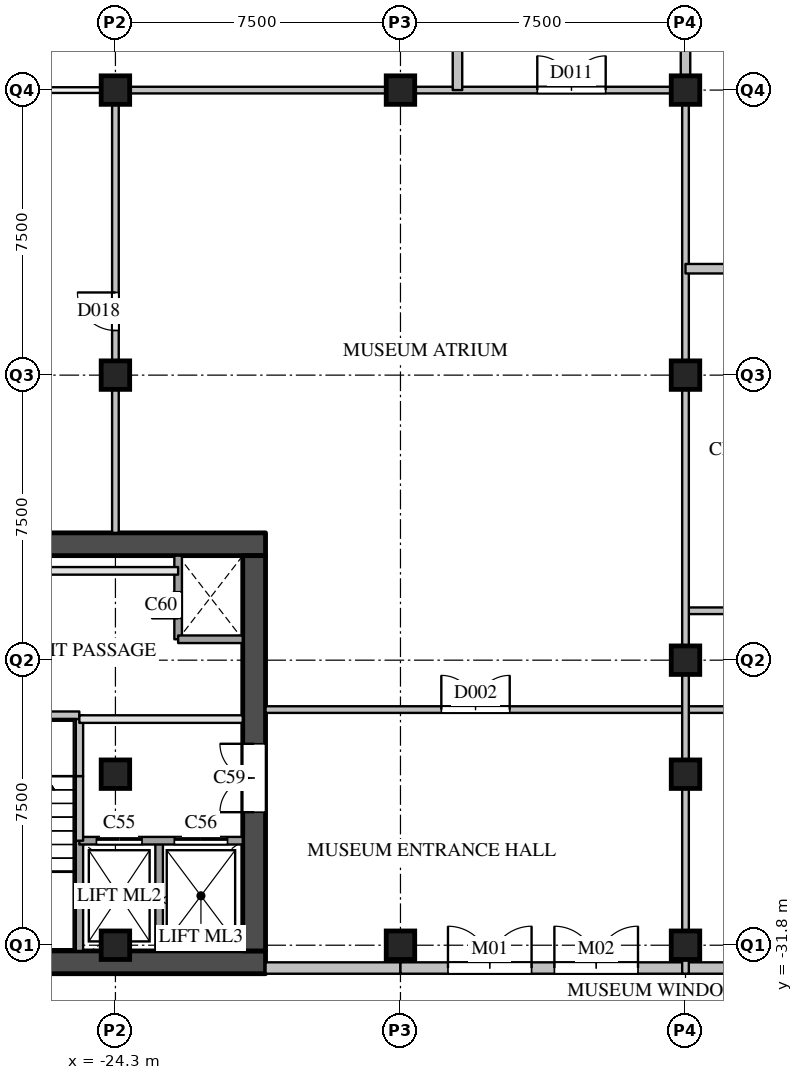
"""IFC4 building model, lengths in metres.
Left out: names, types, materials, properties, quantities, classifications, styles, units other than length and angle.
Written with IfcOpenShell. Run it as: python <this file> out.ifc"""

import sys

from ifc_helpers import new_model, si_unit, direction, frame, frame_2d, origin, origin_2d, place, context, subcontext, project, spatial, rectangle, extrude, element, fill, save


model = new_model("IFC4")
c1 = context("Model", 3, precision=1e-05, world=origin(), true_north=direction((0.0, 1.0)))
c2 = subcontext(c1, "Body", "Model", "MODEL_VIEW")
j1 = project(units=[si_unit("LENGTHUNIT", "METRE"), si_unit("PLANEANGLEUNIT", "RADIAN")], contexts=[c1])
p1 = place(None, origin())
s1 = spatial("IfcSite", under=j1, at=p1, CompositionType="ELEMENT")
p2 = place(p1, origin())
s2 = spatial("IfcBuilding", under=s1, at=p2, CompositionType="ELEMENT")
p3 = place(p2, origin())
s3 = spatial("IfcBuildingStorey", under=s2, at=p3, CompositionType="ELEMENT", Elevation=0.0)
for number, where, z_axis, x_axis in (
    (1, (-24.3, -31.8, 0.0), (0.0, 0.0, 1.0), (1.0, 0.0, 0.0)),
    (2, (-24.3, -16.8, 0.0), (0.0, 0.0, 1.0), (1.0, 0.0, 0.0)),
    (3, (-24.3, -9.3, 0.0), (0.0, 0.0, 1.0), (1.0, 0.0, 0.0)),
    (4, (-16.8, -31.8, 0.0), (0.0, 0.0, 1.0), (1.0, 0.0, 0.0)),
    (5, (-16.8, -9.3, 0.0), (0.0, 0.0, 1.0), (1.0, 0.0, 0.0)),
    (6, (-9.3, -31.8, 0.0), (0.0, 0.0, 1.0), (1.0, 0.0, 0.0)),
    (7, (-9.3, -24.3, 0.0), (0.0, 0.0, 1.0), (1.0, 0.0, 0.0)),
    (8, (-9.3, -16.8, 0.0), (0.0, 0.0, 1.0), (1.0, 0.0, 0.0)),
    (9, (-9.3, -9.3, 0.0), (0.0, 0.0, 1.0), (1.0, 0.0, 0.0)),
    (10, (-24.3, -27.3, 0.0), (0.0, 0.0, 1.0), (1.0, 0.0, 0.0)),
    (11, (-9.3, -27.3, 0.0), (0.0, 0.0, 1.0), (1.0, 0.0, 0.0)),
):
    element("IfcColumn", number, at=place(p3, frame(where, z_axis=z_axis, x_axis=x_axis)), inside=s3, PredefinedType="COLUMN", context=c2, shape_type="SweptSolid", body=[
        extrude(rectangle(XDim=0.75, YDim=0.75, at=origin_2d()), origin(), (0.0, 0.0, 1.0), 8.0),
    ])
p4 = place(p3, frame((-20.35, -32.4, 0.0), z_axis=(0.0, 0.0, 1.0), x_axis=(1.0, 0.0, 0.0)))
e12 = element("IfcWall", 12, at=p4, inside=s3, PredefinedType="SOLIDWALL", context=c2, shape_type="SweptSolid", body=[
    extrude(rectangle(XDim=3.55, YDim=0.3, at=frame_2d((1.775, 0.0))), origin(), (0.0, 0.0, 1.0), 7.59),
])
p5 = place(p3, frame((-16.8, -32.4, 0.0), z_axis=(0.0, 0.0, 1.0), x_axis=(1.0, 0.0, 0.0)))
e13 = element("IfcWall", 13, at=p5, inside=s3, PredefinedType="SOLIDWALL", context=c2, shape_type="SweptSolid", body=[
    extrude(rectangle(XDim=7.5, YDim=0.3, at=frame_2d((3.75, 0.0))), origin(), (0.0, 0.0, 1.0), 7.59),
])
p6 = place(p5, frame((1.25, 0.0, 0.0)))
e14 = element("IfcOpeningElement", 14, at=p6, cuts=e13, PredefinedType="OPENING", context=c2, shape_type="SweptSolid", body=[
    extrude(rectangle(XDim=2.2, YDim=2.4, at=frame_2d((1.1, 1.2))), frame((0.0, 0.16, 0.0), z_axis=(0.0, -1.0, 0.0), x_axis=(1.0, 0.0, 0.0)), (0.0, 0.0, 1.0), 0.32),
])
p7 = place(p5, frame((4.05, 0.0, 0.0)))
e15 = element("IfcOpeningElement", 15, at=p7, cuts=e13, PredefinedType="OPENING", context=c2, shape_type="SweptSolid", body=[
    extrude(rectangle(XDim=2.2, YDim=2.4, at=frame_2d((1.1, 1.2))), frame((0.0, 0.16, 0.0), z_axis=(0.0, -1.0, 0.0), x_axis=(1.0, 0.0, 0.0)), (0.0, 0.0, 1.0), 0.32),
])
p8 = place(p3, frame((-9.3, -32.4, 0.0), z_axis=(0.0, 0.0, 1.0), x_axis=(1.0, 0.0, 0.0)))
e16 = element("IfcWall", 16, at=p8, inside=s3, PredefinedType="SOLIDWALL", context=c2, shape_type="SweptSolid", body=[
    extrude(rectangle(XDim=7.5, YDim=0.3, at=frame_2d((3.75, 0.0))), origin(), (0.0, 0.0, 1.0), 7.59),
])
p9 = place(p8, frame((1.95, 0.0, 0.9)))
e17 = element("IfcOpeningElement", 17, at=p9, cuts=e16, PredefinedType="OPENING", context=c2, shape_type="SweptSolid", body=[
    extrude(rectangle(XDim=3.6, YDim=3.0, at=frame_2d((1.8, 1.5))), frame((0.0, 0.16, 0.0), z_axis=(0.0, -1.0, 0.0), x_axis=(1.0, 0.0, 0.0)), (0.0, 0.0, 1.0), 0.32),
])
for number, where, z_axis, x_axis in (
    (18, (-32.55, -32.25, 0.0), (0.0, 0.0, 1.0), (1.0, 0.0, 0.0)),
    (19, (-32.55, -21.25, 0.0), (0.0, 0.0, 1.0), (1.0, 0.0, 0.0)),
):
    element("IfcWall", number, at=place(p3, frame(where, z_axis=z_axis, x_axis=x_axis)), inside=s3, PredefinedType="SHEAR", context=c2, shape_type="SweptSolid", body=[
        extrude(rectangle(XDim=12.2, YDim=0.6, at=frame_2d((6.1, 0.0))), origin(), (0.0, 0.0, 1.0), 7.59),
    ])
p10 = place(p3, frame((-20.65, -31.95, 0.0), z_axis=(0.0, 0.0, 1.0), x_axis=(0.0, 1.0, 0.0)))
e20 = element("IfcWall", 20, at=p10, inside=s3, PredefinedType="SHEAR", context=c2, shape_type="SweptSolid", body=[
    extrude(rectangle(XDim=10.4, YDim=0.6, at=frame_2d((5.2, 0.0))), origin(), (0.0, 0.0, 1.0), 7.59),
])
p11 = place(p10, frame((3.65, 0.0, 0.0)))
e21 = element("IfcOpeningElement", 21, at=p11, cuts=e20, PredefinedType="OPENING", context=c2, shape_type="SweptSolid", body=[
    extrude(rectangle(XDim=1.8, YDim=2.1, at=frame_2d((0.9, 1.05))), frame((0.0, 0.31, 0.0), z_axis=(0.0, -1.0, 0.0), x_axis=(1.0, 0.0, 0.0)), (0.0, 0.0, 1.0), 0.62),
])
p12 = place(p3, frame((-25.25, -31.95, 0.0), z_axis=(0.0, 0.0, 1.0), x_axis=(0.0, 1.0, 0.0)))
e22 = element("IfcWall", 22, at=p12, inside=s3, PredefinedType="SOLIDWALL", context=c2, shape_type="SweptSolid", body=[
    extrude(rectangle(XDim=2.9, YDim=0.2, at=frame_2d((1.45, 0.0))), origin(), (0.0, 0.0, 1.0), 7.59),
])
p13 = place(p3, frame((-25.25, -29.05, 0.0), z_axis=(0.0, 0.0, 1.0), x_axis=(0.0, 1.0, 0.0)))
e23 = element("IfcWall", 23, at=p13, inside=s3, PredefinedType="SOLIDWALL", context=c2, shape_type="SweptSolid", body=[
    extrude(rectangle(XDim=1.7, YDim=0.2, at=frame_2d((0.85, 0.0))), origin(), (0.0, 0.0, 1.0), 7.59),
])
p14 = place(p3, frame((-25.25, -27.35, 0.0), z_axis=(0.0, 0.0, 1.0), x_axis=(0.0, 1.0, 0.0)))
e24 = element("IfcWall", 24, at=p14, inside=s3, PredefinedType="SOLIDWALL", context=c2, shape_type="SweptSolid", body=[
    extrude(rectangle(XDim=1.6, YDim=0.2, at=frame_2d((0.8, 0.0))), origin(), (0.0, 0.0, 1.0), 7.59),
])
p15 = place(p3, frame((-23.15, -31.95, 0.0), z_axis=(0.0, 0.0, 1.0), x_axis=(0.0, 1.0, 0.0)))
e25 = element("IfcWall", 25, at=p15, inside=s3, PredefinedType="SOLIDWALL", context=c2, shape_type="SweptSolid", body=[
    extrude(rectangle(XDim=2.9, YDim=0.2, at=frame_2d((1.45, 0.0))), origin(), (0.0, 0.0, 1.0), 7.59),
])
p16 = place(p3, frame((-22.65, -23.75, 0.0), z_axis=(0.0, 0.0, 1.0), x_axis=(0.0, 1.0, 0.0)))
e26 = element("IfcWall", 26, at=p16, inside=s3, PredefinedType="SOLIDWALL", context=c2, shape_type="SweptSolid", body=[
    extrude(rectangle(XDim=2.2, YDim=0.2, at=frame_2d((1.1, 0.0))), origin(), (0.0, 0.0, 1.0), 7.59),
])
p17 = place(p16, frame((0.55, 0.0, 0.0)))
e27 = element("IfcOpeningElement", 27, at=p17, cuts=e26, PredefinedType="OPENING", context=c2, shape_type="SweptSolid", body=[
    extrude(rectangle(XDim=0.7, YDim=2.1, at=frame_2d((0.35, 1.05))), frame((0.0, 0.11, 0.0), z_axis=(0.0, -1.0, 0.0), x_axis=(1.0, 0.0, 0.0)), (0.0, 0.0, 1.0), 0.22),
])
p18 = place(p3, frame((-25.25, -29.05, 0.0), z_axis=(0.0, 0.0, 1.0), x_axis=(1.0, 0.0, 0.0)))
e28 = element("IfcWall", 28, at=p18, inside=s3, PredefinedType="SOLIDWALL", context=c2, shape_type="SweptSolid", body=[
    extrude(rectangle(XDim=4.3, YDim=0.2, at=frame_2d((2.15, 0.0))), origin(), (0.0, 0.0, 1.0), 7.59),
])
p19 = place(p18, frame((0.45, 0.0, 0.0)))
e29 = element("IfcOpeningElement", 29, at=p19, cuts=e28, PredefinedType="OPENING", context=c2, shape_type="SweptSolid", body=[
    extrude(rectangle(XDim=1.2, YDim=2.1, at=frame_2d((0.6, 1.05))), frame((0.0, 0.11, 0.0), z_axis=(0.0, -1.0, 0.0), x_axis=(1.0, 0.0, 0.0)), (0.0, 0.0, 1.0), 0.22),
])
p20 = place(p18, frame((2.5, 0.0, 0.0)))
e30 = element("IfcOpeningElement", 30, at=p20, cuts=e28, PredefinedType="OPENING", context=c2, shape_type="SweptSolid", body=[
    extrude(rectangle(XDim=1.4, YDim=2.1, at=frame_2d((0.7, 1.05))), frame((0.0, 0.11, 0.0), z_axis=(0.0, -1.0, 0.0), x_axis=(1.0, 0.0, 0.0)), (0.0, 0.0, 1.0), 0.22),
])
p21 = place(p3, frame((-25.25, -25.85, 0.0), z_axis=(0.0, 0.0, 1.0), x_axis=(1.0, 0.0, 0.0)))
e31 = element("IfcWall", 31, at=p21, inside=s3, PredefinedType="PARTITIONING", context=c2, shape_type="SweptSolid", body=[
    extrude(rectangle(XDim=4.3, YDim=0.2, at=frame_2d((2.15, 0.0))), origin(), (0.0, 0.0, 1.0), 7.59),
])
p22 = place(p3, frame((-28.5, -25.75, 0.0), z_axis=(0.0, 0.0, 1.0), x_axis=(1.0, 0.0, 0.0)))
e32 = element("IfcWall", 32, at=p22, inside=s3, PredefinedType="SOLIDWALL", context=c2, shape_type="SweptSolid", body=[
    extrude(rectangle(XDim=3.25, YDim=0.2, at=frame_2d((1.625, 0.0))), origin(), (0.0, 0.0, 1.0), 7.59),
])
p23 = place(p22, frame((1.025, 0.0, 0.0)))
e33 = element("IfcOpeningElement", 33, at=p23, cuts=e32, PredefinedType="OPENING", context=c2, shape_type="SweptSolid", body=[
    extrude(rectangle(XDim=1.1, YDim=2.1, at=frame_2d((0.55, 1.05))), frame((0.0, 0.11, 0.0), z_axis=(0.0, -1.0, 0.0), x_axis=(1.0, 0.0, 0.0)), (0.0, 0.0, 1.0), 0.22),
])
p24 = place(p3, frame((-22.65, -23.75, 0.0), z_axis=(0.0, 0.0, 1.0), x_axis=(1.0, 0.0, 0.0)))
e34 = element("IfcWall", 34, at=p24, inside=s3, PredefinedType="SOLIDWALL", context=c2, shape_type="SweptSolid", body=[
    extrude(rectangle(XDim=1.7, YDim=0.2, at=frame_2d((0.85, 0.0))), origin(), (0.0, 0.0, 1.0), 7.59),
])
p25 = place(p3, frame((-31.95, -21.95, 0.0), z_axis=(0.0, 0.0, 1.0), x_axis=(1.0, 0.0, 0.0)))
e35 = element("IfcWall", 35, at=p25, inside=s3, PredefinedType="PARTITIONING", context=c2, shape_type="SweptSolid", body=[
    extrude(rectangle(XDim=9.3, YDim=0.2, at=frame_2d((4.65, 0.0))), origin(), (0.0, 0.0, 1.0), 7.59),
])
p26 = place(p3, frame((-20.35, -25.6, 0.0), z_axis=(0.0, 0.0, 1.0), x_axis=(1.0, 0.0, 0.0)))
e36 = element("IfcWall", 36, at=p26, inside=s3, PredefinedType="PARTITIONING", context=c2, shape_type="SweptSolid", body=[
    extrude(rectangle(XDim=19.15, YDim=0.175, at=frame_2d((9.575, 0.0))), origin(), (0.0, 0.0, 1.0), 6.79),
])
p27 = place(p26, frame((4.625, 0.0, 0.0)))
e37 = element("IfcOpeningElement", 37, at=p27, cuts=e36, PredefinedType="OPENING", context=c2, shape_type="SweptSolid", body=[
    extrude(rectangle(XDim=1.8, YDim=2.1, at=frame_2d((0.9, 1.05))), frame((0.0, 0.097, 0.0), z_axis=(0.0, -1.0, 0.0), x_axis=(1.0, 0.0, 0.0)), (0.0, 0.0, 1.0), 0.195),
])
p28 = place(p26, frame((14.6, 0.0, 0.0)))
e38 = element("IfcOpeningElement", 38, at=p28, cuts=e36, PredefinedType="OPENING", context=c2, shape_type="SweptSolid", body=[
    extrude(rectangle(XDim=1.0, YDim=2.1, at=frame_2d((0.5, 1.05))), frame((0.0, 0.097, 0.0), z_axis=(0.0, -1.0, 0.0), x_axis=(1.0, 0.0, 0.0)), (0.0, 0.0, 1.0), 0.195),
])
p29 = place(p3, frame((-9.3, -23.0, 0.0), z_axis=(0.0, 0.0, 1.0), x_axis=(1.0, 0.0, 0.0)))
e39 = element("IfcWall", 39, at=p29, inside=s3, PredefinedType="PARTITIONING", context=c2, shape_type="SweptSolid", body=[
    extrude(rectangle(XDim=11.05, YDim=0.175, at=frame_2d((5.525, 0.0))), origin(), (0.0, 0.0, 1.0), 6.79),
])
p30 = place(p29, frame((5.025, 0.0, 0.0)))
e40 = element("IfcOpeningElement", 40, at=p30, cuts=e39, PredefinedType="OPENING", context=c2, shape_type="SweptSolid", body=[
    extrude(rectangle(XDim=1.0, YDim=2.1, at=frame_2d((0.5, 1.05))), frame((0.0, 0.097, 0.0), z_axis=(0.0, -1.0, 0.0), x_axis=(1.0, 0.0, 0.0)), (0.0, 0.0, 1.0), 0.195),
])
p31 = place(p3, frame((-24.3, -9.3, 0.0), z_axis=(0.0, 0.0, 1.0), x_axis=(1.0, 0.0, 0.0)))
e41 = element("IfcWall", 41, at=p31, inside=s3, PredefinedType="PARTITIONING", context=c2, shape_type="SweptSolid", body=[
    extrude(rectangle(XDim=15.0, YDim=0.175, at=frame_2d((7.5, 0.0))), origin(), (0.0, 0.0, 1.0), 6.79),
])
p32 = place(p31, frame((11.1, 0.0, 0.0)))
e42 = element("IfcOpeningElement", 42, at=p32, cuts=e41, PredefinedType="OPENING", context=c2, shape_type="SweptSolid", body=[
    extrude(rectangle(XDim=1.8, YDim=2.1, at=frame_2d((0.9, 1.05))), frame((0.0, 0.097, 0.0), z_axis=(0.0, -1.0, 0.0), x_axis=(1.0, 0.0, 0.0)), (0.0, 0.0, 1.0), 0.195),
])
p33 = place(p3, frame((-24.3, -20.95, 0.0), z_axis=(0.0, 0.0, 1.0), x_axis=(0.0, 1.0, 0.0)))
e43 = element("IfcWall", 43, at=p33, inside=s3, PredefinedType="PARTITIONING", context=c2, shape_type="SweptSolid", body=[
    extrude(rectangle(XDim=11.65, YDim=0.175, at=frame_2d((5.825, 0.0))), origin(), (0.0, 0.0, 1.0), 6.79),
])
p34 = place(p33, frame((5.325, 0.0, 0.0)))
e44 = element("IfcOpeningElement", 44, at=p34, cuts=e43, PredefinedType="OPENING", context=c2, shape_type="SweptSolid", body=[
    extrude(rectangle(XDim=1.0, YDim=2.1, at=frame_2d((0.5, 1.05))), frame((0.0, 0.097, 0.0), z_axis=(0.0, -1.0, 0.0), x_axis=(1.0, 0.0, 0.0)), (0.0, 0.0, 1.0), 0.195),
])
p35 = place(p3, frame((-9.3, -32.55, 0.0), z_axis=(0.0, 0.0, 1.0), x_axis=(0.0, 1.0, 0.0)))
e45 = element("IfcWall", 45, at=p35, inside=s3, PredefinedType="PARTITIONING", context=c2, shape_type="SweptSolid", body=[
    extrude(rectangle(XDim=23.25, YDim=0.175, at=frame_2d((11.625, 0.0))), origin(), (0.0, 0.0, 1.0), 6.79),
])
p36 = place(p3, frame((-27.3, -9.3, 0.0), z_axis=(0.0, 0.0, 1.0), x_axis=(1.0, 0.0, 0.0)))
e46 = element("IfcWall", 46, at=p36, inside=s3, PredefinedType="PARTITIONING", context=c2, shape_type="SweptSolid", body=[
    extrude(rectangle(XDim=3.0, YDim=0.15, at=frame_2d((1.5, 0.0))), origin(), (0.0, 0.0, 1.0), 6.79),
])
p37 = place(p3, frame((-9.3, -14.0, 0.0), z_axis=(0.0, 0.0, 1.0), x_axis=(1.0, 0.0, 0.0)))
e47 = element("IfcWall", 47, at=p37, inside=s3, PredefinedType="PARTITIONING", context=c2, shape_type="SweptSolid", body=[
    extrude(rectangle(XDim=13.425, YDim=0.25, at=frame_2d((6.712, 0.0))), origin(), (0.0, 0.0, 1.0), 6.79),
])
p38 = place(p3, frame((-15.3, -9.3, 0.0), z_axis=(0.0, 0.0, 1.0), x_axis=(0.0, 1.0, 0.0)))
e48 = element("IfcWall", 48, at=p38, inside=s3, PredefinedType="PARTITIONING", context=c2, shape_type="SweptSolid", body=[
    extrude(rectangle(XDim=21.3, YDim=0.25, at=frame_2d((10.65, 0.0))), origin(), (0.0, 0.0, 1.0), 6.79),
])
p39 = place(p3, frame((-9.3, -9.3, 0.0), z_axis=(0.0, 0.0, 1.0), x_axis=(0.0, 1.0, 0.0)))
e49 = element("IfcWall", 49, at=p39, inside=s3, PredefinedType="PARTITIONING", context=c2, shape_type="SweptSolid", body=[
    extrude(rectangle(XDim=8.375, YDim=0.25, at=frame_2d((4.188, 0.0))), origin(), (0.0, 0.0, 1.0), 6.79),
])
p40 = place(p6, origin())
e50 = element("IfcDoor", 50, at=p40, inside=s3, OperationType="DOUBLE_DOOR_SINGLE_SWING", PredefinedType="DOOR", context=c2, shape_type="SweptSolid", body=[
    extrude(rectangle(XDim=2.2, YDim=2.4, at=frame_2d((1.1, 1.2))), frame((0.0, 0.025, 0.0), z_axis=(0.0, -1.0, 0.0), x_axis=(1.0, 0.0, 0.0)), (0.0, 0.0, 1.0), 0.05),
])
fill(e14, e50)
p41 = place(p7, origin())
e51 = element("IfcDoor", 51, at=p41, inside=s3, OperationType="DOUBLE_DOOR_SINGLE_SWING", PredefinedType="DOOR", context=c2, shape_type="SweptSolid", body=[
    extrude(rectangle(XDim=2.2, YDim=2.4, at=frame_2d((1.1, 1.2))), frame((0.0, 0.025, 0.0), z_axis=(0.0, -1.0, 0.0), x_axis=(1.0, 0.0, 0.0)), (0.0, 0.0, 1.0), 0.05),
])
fill(e15, e51)
p42 = place(p19, origin())
e52 = element("IfcDoor", 52, at=p42, inside=s3, OperationType="SLIDING_TO_LEFT", PredefinedType="DOOR", context=c2, shape_type="SweptSolid", body=[
    extrude(rectangle(XDim=1.2, YDim=2.1, at=frame_2d((0.6, 1.05))), frame((0.0, 0.025, 0.0), z_axis=(0.0, -1.0, 0.0), x_axis=(1.0, 0.0, 0.0)), (0.0, 0.0, 1.0), 0.05),
])
fill(e29, e52)
p43 = place(p20, origin())
e53 = element("IfcDoor", 53, at=p43, inside=s3, OperationType="SLIDING_TO_LEFT", PredefinedType="DOOR", context=c2, shape_type="SweptSolid", body=[
    extrude(rectangle(XDim=1.4, YDim=2.1, at=frame_2d((0.7, 1.05))), frame((0.0, 0.025, 0.0), z_axis=(0.0, -1.0, 0.0), x_axis=(1.0, 0.0, 0.0)), (0.0, 0.0, 1.0), 0.05),
])
fill(e30, e53)
p44 = place(p11, origin())
e54 = element("IfcDoor", 54, at=p44, inside=s3, OperationType="DOUBLE_DOOR_SINGLE_SWING", PredefinedType="DOOR", context=c2, shape_type="SweptSolid", body=[
    extrude(rectangle(XDim=1.8, YDim=2.1, at=frame_2d((0.9, 1.05))), frame((0.0, 0.025, 0.0), z_axis=(0.0, -1.0, 0.0), x_axis=(1.0, 0.0, 0.0)), (0.0, 0.0, 1.0), 0.05),
])
fill(e21, e54)
p45 = place(p17, origin())
e55 = element("IfcDoor", 55, at=p45, inside=s3, OperationType="SINGLE_SWING_LEFT", PredefinedType="DOOR", context=c2, shape_type="SweptSolid", body=[
    extrude(rectangle(XDim=0.7, YDim=2.1, at=frame_2d((0.35, 1.05))), frame((0.0, 0.025, 0.0), z_axis=(0.0, -1.0, 0.0), x_axis=(1.0, 0.0, 0.0)), (0.0, 0.0, 1.0), 0.05),
])
fill(e27, e55)
p46 = place(p27, origin())
e56 = element("IfcDoor", 56, at=p46, inside=s3, OperationType="DOUBLE_DOOR_SINGLE_SWING", PredefinedType="DOOR", context=c2, shape_type="SweptSolid", body=[
    extrude(rectangle(XDim=1.8, YDim=2.1, at=frame_2d((0.9, 1.05))), frame((0.0, 0.025, 0.0), z_axis=(0.0, -1.0, 0.0), x_axis=(1.0, 0.0, 0.0)), (0.0, 0.0, 1.0), 0.05),
])
fill(e37, e56)
p47 = place(p32, origin())
e57 = element("IfcDoor", 57, at=p47, inside=s3, OperationType="DOUBLE_DOOR_SINGLE_SWING", PredefinedType="DOOR", context=c2, shape_type="SweptSolid", body=[
    extrude(rectangle(XDim=1.8, YDim=2.1, at=frame_2d((0.9, 1.05))), frame((0.0, 0.025, 0.0), z_axis=(0.0, -1.0, 0.0), x_axis=(1.0, 0.0, 0.0)), (0.0, 0.0, 1.0), 0.05),
])
fill(e42, e57)
p48 = place(p34, origin())
e58 = element("IfcDoor", 58, at=p48, inside=s3, OperationType="SINGLE_SWING_RIGHT", PredefinedType="DOOR", context=c2, shape_type="SweptSolid", body=[
    extrude(rectangle(XDim=1.0, YDim=2.1, at=frame_2d((0.5, 1.05))), frame((0.0, 0.025, 0.0), z_axis=(0.0, -1.0, 0.0), x_axis=(1.0, 0.0, 0.0)), (0.0, 0.0, 1.0), 0.05),
])
fill(e44, e58)
save(model, sys.argv[1])
